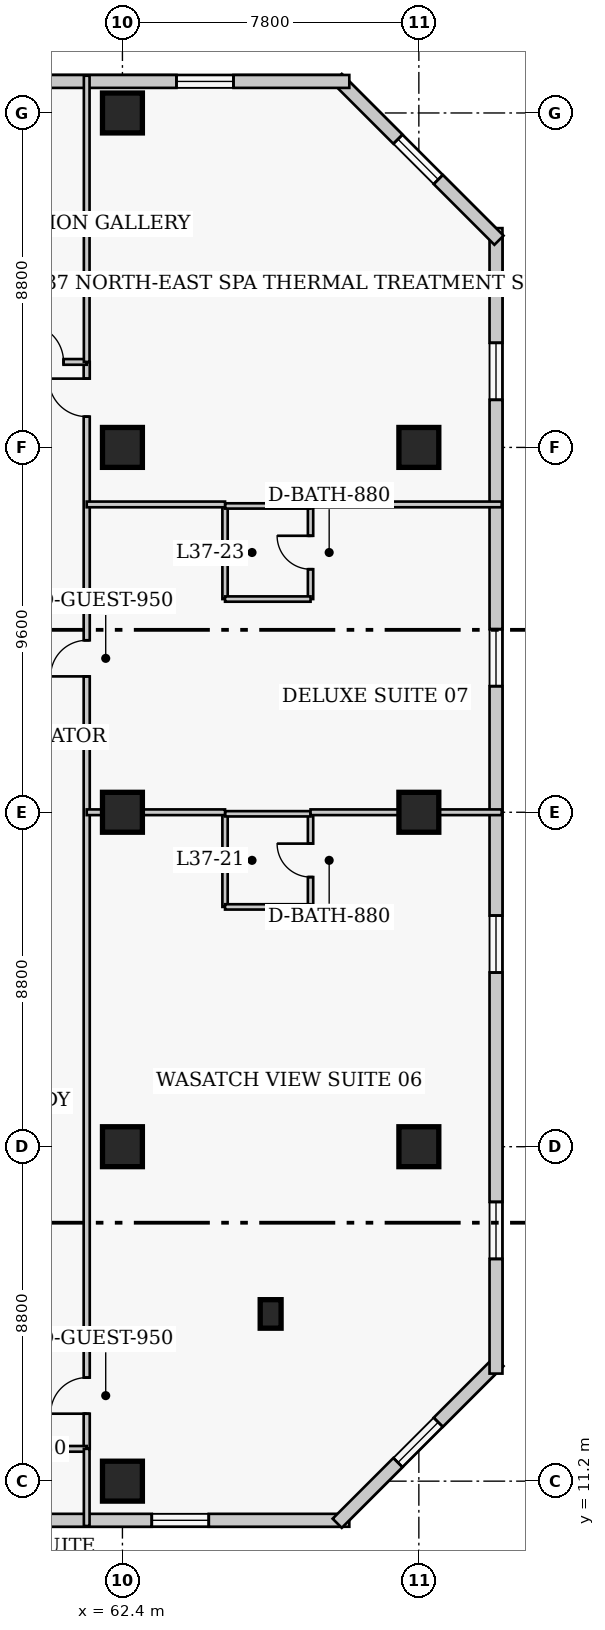
"""IFC4 building model, lengths in metres.
Left out: names, types, materials, properties, quantities, classifications, styles, units other than length and angle.
Written with IfcOpenShell. Run it as: python <this file> out.ifc"""

import sys

from ifc_helpers import new_model, si_unit, direction, frame, frame_2d, origin, origin_2d, place, context, subcontext, project, spatial, rectangle, extrude, element, fill, save


model = new_model("IFC4")
c1 = context("Model", 3, precision=1e-05, world=origin(), true_north=direction((0.0, 1.0)))
c2 = subcontext(c1, "Body", "Model", "MODEL_VIEW")
j1 = project(units=[si_unit("LENGTHUNIT", "METRE"), si_unit("PLANEANGLEUNIT", "RADIAN")], contexts=[c1])
p1 = place(None, origin())
s1 = spatial("IfcSite", under=j1, at=p1, CompositionType="ELEMENT")
p2 = place(p1, origin())
s2 = spatial("IfcBuilding", under=s1, at=p2, CompositionType="ELEMENT")
p3 = place(p2, frame((0.0, 0.0, 149.8)))
s3 = spatial("IfcBuildingStorey", under=s2, at=p3, CompositionType="ELEMENT", Elevation=149.8)
for number, where, z_axis, x_axis in (
    (1, (62.4, 11.2, 0.0), (0.0, 0.0, 1.0), (1.0, 0.0, 0.0)),
    (2, (62.4, 20.0, 0.0), (0.0, 0.0, 1.0), (1.0, 0.0, 0.0)),
    (3, (62.4, 28.8, 0.0), (0.0, 0.0, 1.0), (1.0, 0.0, 0.0)),
    (4, (62.4, 38.4, 0.0), (0.0, 0.0, 1.0), (1.0, 0.0, 0.0)),
    (5, (62.4, 47.2, 0.0), (0.0, 0.0, 1.0), (1.0, 0.0, 0.0)),
    (6, (70.2, 20.0, 0.0), (0.0, 0.0, 1.0), (1.0, 0.0, 0.0)),
    (7, (70.2, 28.8, 0.0), (0.0, 0.0, 1.0), (1.0, 0.0, 0.0)),
    (8, (70.2, 38.4, 0.0), (0.0, 0.0, 1.0), (1.0, 0.0, 0.0)),
):
    element("IfcColumn", number, at=place(p3, frame(where, z_axis=z_axis, x_axis=x_axis)), inside=s3, PredefinedType="COLUMN", context=c2, shape_type="SweptSolid", body=[
        extrude(rectangle(XDim=1.05, YDim=1.05, at=origin_2d()), origin(), (0.0, 0.0, 1.0), 3.8),
    ])
p4 = place(p3, frame((66.3, 15.6, 0.0), z_axis=(0.0, 0.0, 1.0), x_axis=(1.0, 0.0, 0.0)))
e9 = element("IfcColumn", 9, at=p4, inside=s3, PredefinedType="PILASTER", context=c2, shape_type="SweptSolid", body=[
    extrude(rectangle(XDim=0.55, YDim=0.75, at=origin_2d()), origin(), (0.0, 0.0, 1.0), 3.8),
])
p5 = place(p3, frame((41.68, 10.17, 0.0), z_axis=(0.0, 0.0, 1.0), x_axis=(1.0, 0.0, 0.0)))
e10 = element("IfcWall", 10, at=p5, inside=s3, PredefinedType="SOLIDWALL", context=c2, shape_type="SweptSolid", body=[
    extrude(rectangle(XDim=26.69, YDim=0.34, at=frame_2d((13.345, 0.0))), origin(), (0.0, 0.0, 1.0), 3.55),
])
p6 = place(p5, frame((2.548, 0.0, 0.85)))
e11 = element("IfcOpeningElement", 11, at=p6, cuts=e10, PredefinedType="OPENING", context=c2, shape_type="SweptSolid", body=[
    extrude(rectangle(XDim=1.5, YDim=1.75, at=frame_2d((0.75, 0.875))), frame((0.0, 0.18, 0.0), z_axis=(0.0, -1.0, 0.0), x_axis=(1.0, 0.0, 0.0)), (0.0, 0.0, 1.0), 0.36),
])
p7 = place(p5, frame((13.745, 0.0, 0.85)))
e12 = element("IfcOpeningElement", 12, at=p7, cuts=e10, PredefinedType="OPENING", context=c2, shape_type="SweptSolid", body=[
    extrude(rectangle(XDim=1.5, YDim=1.75, at=frame_2d((0.75, 0.875))), frame((0.0, 0.18, 0.0), z_axis=(0.0, -1.0, 0.0), x_axis=(1.0, 0.0, 0.0)), (0.0, 0.0, 1.0), 0.36),
])
p8 = place(p5, frame((21.492, 0.0, 0.85)))
e13 = element("IfcOpeningElement", 13, at=p8, cuts=e10, PredefinedType="OPENING", context=c2, shape_type="SweptSolid", body=[
    extrude(rectangle(XDim=1.5, YDim=1.75, at=frame_2d((0.75, 0.875))), frame((0.0, 0.18, 0.0), z_axis=(0.0, -1.0, 0.0), x_axis=(1.0, 0.0, 0.0)), (0.0, 0.0, 1.0), 0.36),
])
p9 = place(p3, frame((68.052, 10.092, 0.0), z_axis=(0.0, 0.0, 1.0), x_axis=(0.707106781187, 0.707106781187, 0.0)))
e14 = element("IfcWall", 14, at=p9, inside=s3, PredefinedType="SOLIDWALL", context=c2, shape_type="SweptSolid", body=[
    extrude(rectangle(XDim=6.02, YDim=0.34, at=frame_2d((3.01, 0.0))), origin(), (0.0, 0.0, 1.0), 3.55),
])
p10 = place(p9, frame((2.26, 0.0, 0.85)))
e15 = element("IfcOpeningElement", 15, at=p10, cuts=e14, PredefinedType="OPENING", context=c2, shape_type="SweptSolid", body=[
    extrude(rectangle(XDim=1.5, YDim=1.75, at=frame_2d((0.75, 0.875))), frame((0.0, 0.18, 0.0), z_axis=(0.0, -1.0, 0.0), x_axis=(1.0, 0.0, 0.0)), (0.0, 0.0, 1.0), 0.36),
])
p11 = place(p3, frame((72.23, 14.03, 0.0), z_axis=(0.0, 0.0, 1.0), x_axis=(0.0, 1.0, 0.0)))
e16 = element("IfcWall", 16, at=p11, inside=s3, PredefinedType="SOLIDWALL", context=c2, shape_type="SweptSolid", body=[
    extrude(rectangle(XDim=30.14, YDim=0.34, at=frame_2d((15.07, 0.0))), origin(), (0.0, 0.0, 1.0), 3.55),
])
p12 = place(p11, frame((3.018, 0.0, 0.85)))
e17 = element("IfcOpeningElement", 17, at=p12, cuts=e16, PredefinedType="OPENING", context=c2, shape_type="SweptSolid", body=[
    extrude(rectangle(XDim=1.5, YDim=1.75, at=frame_2d((0.75, 0.875))), frame((0.0, 0.18, 0.0), z_axis=(0.0, -1.0, 0.0), x_axis=(1.0, 0.0, 0.0)), (0.0, 0.0, 1.0), 0.36),
])
p13 = place(p11, frame((10.552, 0.0, 0.85)))
e18 = element("IfcOpeningElement", 18, at=p13, cuts=e16, PredefinedType="OPENING", context=c2, shape_type="SweptSolid", body=[
    extrude(rectangle(XDim=1.5, YDim=1.75, at=frame_2d((0.75, 0.875))), frame((0.0, 0.18, 0.0), z_axis=(0.0, -1.0, 0.0), x_axis=(1.0, 0.0, 0.0)), (0.0, 0.0, 1.0), 0.36),
])
p14 = place(p11, frame((18.087, 0.0, 0.85)))
e19 = element("IfcOpeningElement", 19, at=p14, cuts=e16, PredefinedType="OPENING", context=c2, shape_type="SweptSolid", body=[
    extrude(rectangle(XDim=1.5, YDim=1.75, at=frame_2d((0.75, 0.875))), frame((0.0, 0.18, 0.0), z_axis=(0.0, -1.0, 0.0), x_axis=(1.0, 0.0, 0.0)), (0.0, 0.0, 1.0), 0.36),
])
p15 = place(p11, frame((25.623, 0.0, 0.85)))
e20 = element("IfcOpeningElement", 20, at=p15, cuts=e16, PredefinedType="OPENING", context=c2, shape_type="SweptSolid", body=[
    extrude(rectangle(XDim=1.5, YDim=1.75, at=frame_2d((0.75, 0.875))), frame((0.0, 0.18, 0.0), z_axis=(0.0, -1.0, 0.0), x_axis=(1.0, 0.0, 0.0)), (0.0, 0.0, 1.0), 0.36),
])
p16 = place(p3, frame((72.308, 43.852, 0.0), z_axis=(0.0, 0.0, 1.0), x_axis=(-0.707106781187, 0.707106781187, 0.0)))
e21 = element("IfcWall", 21, at=p16, inside=s3, PredefinedType="SOLIDWALL", context=c2, shape_type="SweptSolid", body=[
    extrude(rectangle(XDim=6.02, YDim=0.34, at=frame_2d((3.01, 0.0))), origin(), (0.0, 0.0, 1.0), 3.55),
])
p17 = place(p16, frame((2.26, 0.0, 0.85)))
e22 = element("IfcOpeningElement", 22, at=p17, cuts=e21, PredefinedType="OPENING", context=c2, shape_type="SweptSolid", body=[
    extrude(rectangle(XDim=1.5, YDim=1.75, at=frame_2d((0.75, 0.875))), frame((0.0, 0.18, 0.0), z_axis=(0.0, -1.0, 0.0), x_axis=(1.0, 0.0, 0.0)), (0.0, 0.0, 1.0), 0.36),
])
p18 = place(p3, frame((68.37, 48.03, 0.0), z_axis=(0.0, 0.0, 1.0), x_axis=(-1.0, 0.0, 0.0)))
e23 = element("IfcWall", 23, at=p18, inside=s3, PredefinedType="SOLIDWALL", context=c2, shape_type="SweptSolid", body=[
    extrude(rectangle(XDim=26.69, YDim=0.34, at=frame_2d((13.345, 0.0))), origin(), (0.0, 0.0, 1.0), 3.55),
])
p19 = place(p18, frame((16.97, 0.0, 0.0)))
e24 = element("IfcOpeningElement", 24, at=p19, cuts=e23, PredefinedType="OPENING", context=c2, shape_type="SweptSolid", body=[
    extrude(rectangle(XDim=1.4, YDim=2.15, at=frame_2d((0.7, 1.075))), frame((0.0, 0.18, 0.0), z_axis=(0.0, -1.0, 0.0), x_axis=(1.0, 0.0, 0.0)), (0.0, 0.0, 1.0), 0.36),
])
p20 = place(p18, frame((3.048, 0.0, 0.85)))
e25 = element("IfcOpeningElement", 25, at=p20, cuts=e23, PredefinedType="OPENING", context=c2, shape_type="SweptSolid", body=[
    extrude(rectangle(XDim=1.5, YDim=1.75, at=frame_2d((0.75, 0.875))), frame((0.0, 0.18, 0.0), z_axis=(0.0, -1.0, 0.0), x_axis=(1.0, 0.0, 0.0)), (0.0, 0.0, 1.0), 0.36),
])
p21 = place(p18, frame((11.445, 0.0, 0.85)))
e26 = element("IfcOpeningElement", 26, at=p21, cuts=e23, PredefinedType="OPENING", context=c2, shape_type="SweptSolid", body=[
    extrude(rectangle(XDim=1.5, YDim=1.75, at=frame_2d((0.75, 0.875))), frame((0.0, 0.18, 0.0), z_axis=(0.0, -1.0, 0.0), x_axis=(1.0, 0.0, 0.0)), (0.0, 0.0, 1.0), 0.36),
])
p22 = place(p18, frame((22.642, 0.0, 0.85)))
e27 = element("IfcOpeningElement", 27, at=p22, cuts=e23, PredefinedType="OPENING", context=c2, shape_type="SweptSolid", body=[
    extrude(rectangle(XDim=1.5, YDim=1.75, at=frame_2d((0.75, 0.875))), frame((0.0, 0.18, 0.0), z_axis=(0.0, -1.0, 0.0), x_axis=(1.0, 0.0, 0.0)), (0.0, 0.0, 1.0), 0.36),
])
p23 = place(p3, frame((61.46, 12.05, 0.0), z_axis=(0.0, 0.0, 1.0), x_axis=(0.0, 1.0, 0.0)))
e28 = element("IfcWall", 28, at=p23, inside=s3, PredefinedType="PARTITIONING", context=c2, shape_type="SweptSolid", body=[
    extrude(rectangle(XDim=28.6, YDim=0.16, at=frame_2d((14.3, 0.0))), origin(), (0.0, 0.0, 1.0), 3.55),
])
p24 = place(p23, frame((0.925, 0.0, 0.0)))
e29 = element("IfcOpeningElement", 29, at=p24, cuts=e28, PredefinedType="OPENING", context=c2, shape_type="SweptSolid", body=[
    extrude(rectangle(XDim=0.95, YDim=2.1, at=frame_2d((0.475, 1.05))), frame((0.0, 0.09, 0.0), z_axis=(0.0, -1.0, 0.0), x_axis=(1.0, 0.0, 0.0)), (0.0, 0.0, 1.0), 0.18),
])
p25 = place(p23, frame((20.325, 0.0, 0.0)))
e30 = element("IfcOpeningElement", 30, at=p25, cuts=e28, PredefinedType="OPENING", context=c2, shape_type="SweptSolid", body=[
    extrude(rectangle(XDim=0.95, YDim=2.1, at=frame_2d((0.475, 1.05))), frame((0.0, 0.09, 0.0), z_axis=(0.0, -1.0, 0.0), x_axis=(1.0, 0.0, 0.0)), (0.0, 0.0, 1.0), 0.18),
])
p26 = place(p23, frame((27.16, 0.0, 0.0)))
e31 = element("IfcOpeningElement", 31, at=p26, cuts=e28, PredefinedType="OPENING", context=c2, shape_type="SweptSolid", body=[
    extrude(rectangle(XDim=1.0, YDim=2.15, at=frame_2d((0.5, 1.075))), frame((0.0, 0.09, 0.0), z_axis=(0.0, -1.0, 0.0), x_axis=(1.0, 0.0, 0.0)), (0.0, 0.0, 1.0), 0.18),
])
p27 = place(p3, frame((59.24, 12.05, 0.0), z_axis=(0.0, 0.0, 1.0), x_axis=(1.0, 0.0, 0.0)))
e32 = element("IfcWall", 32, at=p27, inside=s3, PredefinedType="PARTITIONING", context=c2, shape_type="SweptSolid", body=[
    extrude(rectangle(XDim=2.22, YDim=0.15, at=frame_2d((1.11, 0.0))), origin(), (0.0, 0.0, 1.0), 3.55),
])
p28 = place(p3, frame((56.8, 40.65, 0.0), z_axis=(0.0, 0.0, 1.0), x_axis=(1.0, 0.0, 0.0)))
e33 = element("IfcWall", 33, at=p28, inside=s3, PredefinedType="PARTITIONING", context=c2, shape_type="SweptSolid", body=[
    extrude(rectangle(XDim=4.66, YDim=0.15, at=frame_2d((2.33, 0.0))), origin(), (0.0, 0.0, 1.0), 3.55),
])
p29 = place(p28, frame((3.05, 0.0, 0.0)))
e34 = element("IfcOpeningElement", 34, at=p29, cuts=e33, PredefinedType="OPENING", context=c2, shape_type="SweptSolid", body=[
    extrude(rectangle(XDim=1.0, YDim=2.15, at=frame_2d((0.5, 1.075))), frame((0.0, 0.085, 0.0), z_axis=(0.0, -1.0, 0.0), x_axis=(1.0, 0.0, 0.0)), (0.0, 0.0, 1.0), 0.17),
])
p30 = place(p3, frame((61.46, 40.65, 0.0), z_axis=(0.0, 0.0, 1.0), x_axis=(0.0, 1.0, 0.0)))
e35 = element("IfcWall", 35, at=p30, inside=s3, PredefinedType="PARTITIONING", context=c2, shape_type="SweptSolid", body=[
    extrude(rectangle(XDim=7.53, YDim=0.15, at=frame_2d((3.765, 0.0))), origin(), (0.0, 0.0, 1.0), 3.55),
])
p31 = place(p3, frame((61.46, 10.02, 0.0), z_axis=(0.0, 0.0, 1.0), x_axis=(0.0, 1.0, 0.0)))
e36 = element("IfcWall", 36, at=p31, inside=s3, PredefinedType="PARTITIONING", context=c2, shape_type="SweptSolid", body=[
    extrude(rectangle(XDim=2.03, YDim=0.15, at=frame_2d((1.015, 0.0))), origin(), (0.0, 0.0, 1.0), 3.55),
])
p32 = place(p3, frame((65.1, 26.31, 0.0), z_axis=(0.0, 0.0, 1.0), x_axis=(0.0, 1.0, 0.0)))
e37 = element("IfcWall", 37, at=p32, inside=s3, PredefinedType="PLUMBINGWALL", context=c2, shape_type="SweptSolid", body=[
    extrude(rectangle(XDim=2.45, YDim=0.14, at=frame_2d((1.225, 0.0))), origin(), (0.0, 0.0, 1.0), 3.55),
])
p33 = place(p3, frame((67.35, 26.31, 0.0), z_axis=(0.0, 0.0, 1.0), x_axis=(0.0, 1.0, 0.0)))
e38 = element("IfcWall", 38, at=p33, inside=s3, PredefinedType="PLUMBINGWALL", context=c2, shape_type="SweptSolid", body=[
    extrude(rectangle(XDim=2.45, YDim=0.14, at=frame_2d((1.225, 0.0))), origin(), (0.0, 0.0, 1.0), 3.55),
])
p34 = place(p33, frame((0.785, 0.0, 0.0)))
e39 = element("IfcOpeningElement", 39, at=p34, cuts=e38, PredefinedType="OPENING", context=c2, shape_type="SweptSolid", body=[
    extrude(rectangle(XDim=0.88, YDim=2.05, at=frame_2d((0.44, 1.025))), frame((0.0, 0.08, 0.0), z_axis=(0.0, -1.0, 0.0), x_axis=(1.0, 0.0, 0.0)), (0.0, 0.0, 1.0), 0.16),
])
p35 = place(p3, frame((65.1, 26.31, 0.0), z_axis=(0.0, 0.0, 1.0), x_axis=(1.0, 0.0, 0.0)))
e40 = element("IfcWall", 40, at=p35, inside=s3, PredefinedType="PLUMBINGWALL", context=c2, shape_type="SweptSolid", body=[
    extrude(rectangle(XDim=2.25, YDim=0.14, at=frame_2d((1.125, 0.0))), origin(), (0.0, 0.0, 1.0), 3.55),
])
p36 = place(p3, frame((65.1, 28.76, 0.0), z_axis=(0.0, 0.0, 1.0), x_axis=(1.0, 0.0, 0.0)))
e41 = element("IfcWall", 41, at=p36, inside=s3, PredefinedType="PLUMBINGWALL", context=c2, shape_type="SweptSolid", body=[
    extrude(rectangle(XDim=2.25, YDim=0.14, at=frame_2d((1.125, 0.0))), origin(), (0.0, 0.0, 1.0), 2.9),
])
p37 = place(p3, frame((61.46, 28.8, 0.0), z_axis=(0.0, 0.0, 1.0), x_axis=(1.0, 0.0, 0.0)))
e42 = element("IfcWall", 42, at=p37, inside=s3, PredefinedType="PARTITIONING", context=c2, shape_type="SweptSolid", body=[
    extrude(rectangle(XDim=3.64, YDim=0.15, at=frame_2d((1.82, 0.0))), origin(), (0.0, 0.0, 1.0), 2.778),
])
p38 = place(p3, frame((67.35, 28.8, 0.0), z_axis=(0.0, 0.0, 1.0), x_axis=(1.0, 0.0, 0.0)))
e43 = element("IfcWall", 43, at=p38, inside=s3, PredefinedType="PARTITIONING", context=c2, shape_type="SweptSolid", body=[
    extrude(rectangle(XDim=5.03, YDim=0.15, at=frame_2d((2.515, 0.0))), origin(), (0.0, 0.0, 1.0), 2.778),
])
p39 = place(p3, frame((65.1, 34.41, 0.0), z_axis=(0.0, 0.0, 1.0), x_axis=(0.0, 1.0, 0.0)))
e44 = element("IfcWall", 44, at=p39, inside=s3, PredefinedType="PLUMBINGWALL", context=c2, shape_type="SweptSolid", body=[
    extrude(rectangle(XDim=2.45, YDim=0.14, at=frame_2d((1.225, 0.0))), origin(), (0.0, 0.0, 1.0), 3.55),
])
p40 = place(p3, frame((67.35, 34.41, 0.0), z_axis=(0.0, 0.0, 1.0), x_axis=(0.0, 1.0, 0.0)))
e45 = element("IfcWall", 45, at=p40, inside=s3, PredefinedType="PLUMBINGWALL", context=c2, shape_type="SweptSolid", body=[
    extrude(rectangle(XDim=2.45, YDim=0.14, at=frame_2d((1.225, 0.0))), origin(), (0.0, 0.0, 1.0), 3.55),
])
p41 = place(p40, frame((0.785, 0.0, 0.0)))
e46 = element("IfcOpeningElement", 46, at=p41, cuts=e45, PredefinedType="OPENING", context=c2, shape_type="SweptSolid", body=[
    extrude(rectangle(XDim=0.88, YDim=2.05, at=frame_2d((0.44, 1.025))), frame((0.0, 0.08, 0.0), z_axis=(0.0, -1.0, 0.0), x_axis=(1.0, 0.0, 0.0)), (0.0, 0.0, 1.0), 0.16),
])
for number, where, z_axis, x_axis in (
    (47, (65.1, 34.41, 0.0), (0.0, 0.0, 1.0), (1.0, 0.0, 0.0)),
    (48, (65.1, 36.86, 0.0), (0.0, 0.0, 1.0), (1.0, 0.0, 0.0)),
):
    element("IfcWall", number, at=place(p3, frame(where, z_axis=z_axis, x_axis=x_axis)), inside=s3, PredefinedType="PLUMBINGWALL", context=c2, shape_type="SweptSolid", body=[
        extrude(rectangle(XDim=2.25, YDim=0.14, at=frame_2d((1.125, 0.0))), origin(), (0.0, 0.0, 1.0), 3.55),
    ])
p42 = place(p3, frame((61.46, 36.9, 0.0), z_axis=(0.0, 0.0, 1.0), x_axis=(1.0, 0.0, 0.0)))
e49 = element("IfcWall", 49, at=p42, inside=s3, PredefinedType="PARTITIONING", context=c2, shape_type="SweptSolid", body=[
    extrude(rectangle(XDim=3.64, YDim=0.15, at=frame_2d((1.82, 0.0))), origin(), (0.0, 0.0, 1.0), 3.55),
])
p43 = place(p3, frame((67.35, 36.9, 0.0), z_axis=(0.0, 0.0, 1.0), x_axis=(1.0, 0.0, 0.0)))
e50 = element("IfcWall", 50, at=p43, inside=s3, PredefinedType="PARTITIONING", context=c2, shape_type="SweptSolid", body=[
    extrude(rectangle(XDim=5.03, YDim=0.15, at=frame_2d((2.515, 0.0))), origin(), (0.0, 0.0, 1.0), 3.55),
])
p44 = place(p8, origin())
e51 = element("IfcWindow", 51, at=p44, inside=s3, PartitioningType="SINGLE_PANEL", PredefinedType="WINDOW", context=c2, shape_type="SweptSolid", body=[
    extrude(rectangle(XDim=1.5, YDim=1.75, at=frame_2d((0.75, 0.875))), frame((0.0, 0.03, 0.0), z_axis=(0.0, -1.0, 0.0), x_axis=(1.0, 0.0, 0.0)), (0.0, 0.0, 1.0), 0.06),
])
fill(e13, e51)
p45 = place(p10, origin())
e52 = element("IfcWindow", 52, at=p45, inside=s3, PartitioningType="SINGLE_PANEL", PredefinedType="WINDOW", context=c2, shape_type="SweptSolid", body=[
    extrude(rectangle(XDim=1.5, YDim=1.75, at=frame_2d((0.75, 0.875))), frame((0.0, 0.03, 0.0), z_axis=(0.0, -1.0, 0.0), x_axis=(1.0, 0.0, 0.0)), (0.0, 0.0, 1.0), 0.06),
])
fill(e15, e52)
p46 = place(p12, origin())
e53 = element("IfcWindow", 53, at=p46, inside=s3, PartitioningType="SINGLE_PANEL", PredefinedType="WINDOW", context=c2, shape_type="SweptSolid", body=[
    extrude(rectangle(XDim=1.5, YDim=1.75, at=frame_2d((0.75, 0.875))), frame((0.0, 0.03, 0.0), z_axis=(0.0, -1.0, 0.0), x_axis=(1.0, 0.0, 0.0)), (0.0, 0.0, 1.0), 0.06),
])
fill(e17, e53)
p47 = place(p13, origin())
e54 = element("IfcWindow", 54, at=p47, inside=s3, PartitioningType="SINGLE_PANEL", PredefinedType="WINDOW", context=c2, shape_type="SweptSolid", body=[
    extrude(rectangle(XDim=1.5, YDim=1.75, at=frame_2d((0.75, 0.875))), frame((0.0, 0.03, 0.0), z_axis=(0.0, -1.0, 0.0), x_axis=(1.0, 0.0, 0.0)), (0.0, 0.0, 1.0), 0.06),
])
fill(e18, e54)
p48 = place(p14, origin())
e55 = element("IfcWindow", 55, at=p48, inside=s3, PartitioningType="SINGLE_PANEL", PredefinedType="WINDOW", context=c2, shape_type="SweptSolid", body=[
    extrude(rectangle(XDim=1.5, YDim=1.75, at=frame_2d((0.75, 0.875))), frame((0.0, 0.03, 0.0), z_axis=(0.0, -1.0, 0.0), x_axis=(1.0, 0.0, 0.0)), (0.0, 0.0, 1.0), 0.06),
])
fill(e19, e55)
p49 = place(p15, origin())
e56 = element("IfcWindow", 56, at=p49, inside=s3, PartitioningType="SINGLE_PANEL", PredefinedType="WINDOW", context=c2, shape_type="SweptSolid", body=[
    extrude(rectangle(XDim=1.5, YDim=1.75, at=frame_2d((0.75, 0.875))), frame((0.0, 0.03, 0.0), z_axis=(0.0, -1.0, 0.0), x_axis=(1.0, 0.0, 0.0)), (0.0, 0.0, 1.0), 0.06),
])
fill(e20, e56)
p50 = place(p17, origin())
e57 = element("IfcWindow", 57, at=p50, inside=s3, PartitioningType="SINGLE_PANEL", PredefinedType="WINDOW", context=c2, shape_type="SweptSolid", body=[
    extrude(rectangle(XDim=1.5, YDim=1.75, at=frame_2d((0.75, 0.875))), frame((0.0, 0.03, 0.0), z_axis=(0.0, -1.0, 0.0), x_axis=(1.0, 0.0, 0.0)), (0.0, 0.0, 1.0), 0.06),
])
fill(e22, e57)
p51 = place(p20, origin())
e58 = element("IfcWindow", 58, at=p51, inside=s3, PartitioningType="SINGLE_PANEL", PredefinedType="WINDOW", context=c2, shape_type="SweptSolid", body=[
    extrude(rectangle(XDim=1.5, YDim=1.75, at=frame_2d((0.75, 0.875))), frame((0.0, 0.03, 0.0), z_axis=(0.0, -1.0, 0.0), x_axis=(1.0, 0.0, 0.0)), (0.0, 0.0, 1.0), 0.06),
])
fill(e25, e58)
p52 = place(p29, origin())
e59 = element("IfcDoor", 59, at=p52, inside=s3, OperationType="SINGLE_SWING_LEFT", PredefinedType="DOOR", context=c2, shape_type="SweptSolid", body=[
    extrude(rectangle(XDim=1.0, YDim=2.15, at=frame_2d((0.5, 1.075))), frame((0.0, 0.025, 0.0), z_axis=(0.0, -1.0, 0.0), x_axis=(1.0, 0.0, 0.0)), (0.0, 0.0, 1.0), 0.05),
])
fill(e34, e59)
p53 = place(p34, origin())
e60 = element("IfcDoor", 60, at=p53, inside=s3, OperationType="SINGLE_SWING_RIGHT", PredefinedType="DOOR", context=c2, shape_type="SweptSolid", body=[
    extrude(rectangle(XDim=0.88, YDim=2.05, at=frame_2d((0.44, 1.025))), frame((0.0, 0.025, 0.0), z_axis=(0.0, -1.0, 0.0), x_axis=(1.0, 0.0, 0.0)), (0.0, 0.0, 1.0), 0.05),
])
fill(e39, e60)
p54 = place(p24, origin())
e61 = element("IfcDoor", 61, at=p54, inside=s3, OperationType="SINGLE_SWING_LEFT", PredefinedType="DOOR", context=c2, shape_type="SweptSolid", body=[
    extrude(rectangle(XDim=0.95, YDim=2.1, at=frame_2d((0.475, 1.05))), frame((0.0, 0.025, 0.0), z_axis=(0.0, -1.0, 0.0), x_axis=(1.0, 0.0, 0.0)), (0.0, 0.0, 1.0), 0.05),
])
fill(e29, e61)
p55 = place(p41, origin())
e62 = element("IfcDoor", 62, at=p55, inside=s3, OperationType="SINGLE_SWING_RIGHT", PredefinedType="DOOR", context=c2, shape_type="SweptSolid", body=[
    extrude(rectangle(XDim=0.88, YDim=2.05, at=frame_2d((0.44, 1.025))), frame((0.0, 0.025, 0.0), z_axis=(0.0, -1.0, 0.0), x_axis=(1.0, 0.0, 0.0)), (0.0, 0.0, 1.0), 0.05),
])
fill(e46, e62)
p56 = place(p25, origin())
e63 = element("IfcDoor", 63, at=p56, inside=s3, OperationType="SINGLE_SWING_LEFT", PredefinedType="DOOR", context=c2, shape_type="SweptSolid", body=[
    extrude(rectangle(XDim=0.95, YDim=2.1, at=frame_2d((0.475, 1.05))), frame((0.0, 0.025, 0.0), z_axis=(0.0, -1.0, 0.0), x_axis=(1.0, 0.0, 0.0)), (0.0, 0.0, 1.0), 0.05),
])
fill(e30, e63)
p57 = place(p26, origin())
e64 = element("IfcDoor", 64, at=p57, inside=s3, OperationType="SINGLE_SWING_RIGHT", PredefinedType="DOOR", context=c2, shape_type="SweptSolid", body=[
    extrude(rectangle(XDim=1.0, YDim=2.15, at=frame_2d((0.5, 1.075))), frame((0.0, 0.025, 0.0), z_axis=(0.0, -1.0, 0.0), x_axis=(1.0, 0.0, 0.0)), (0.0, 0.0, 1.0), 0.05),
])
fill(e31, e64)
save(model, sys.argv[1])
